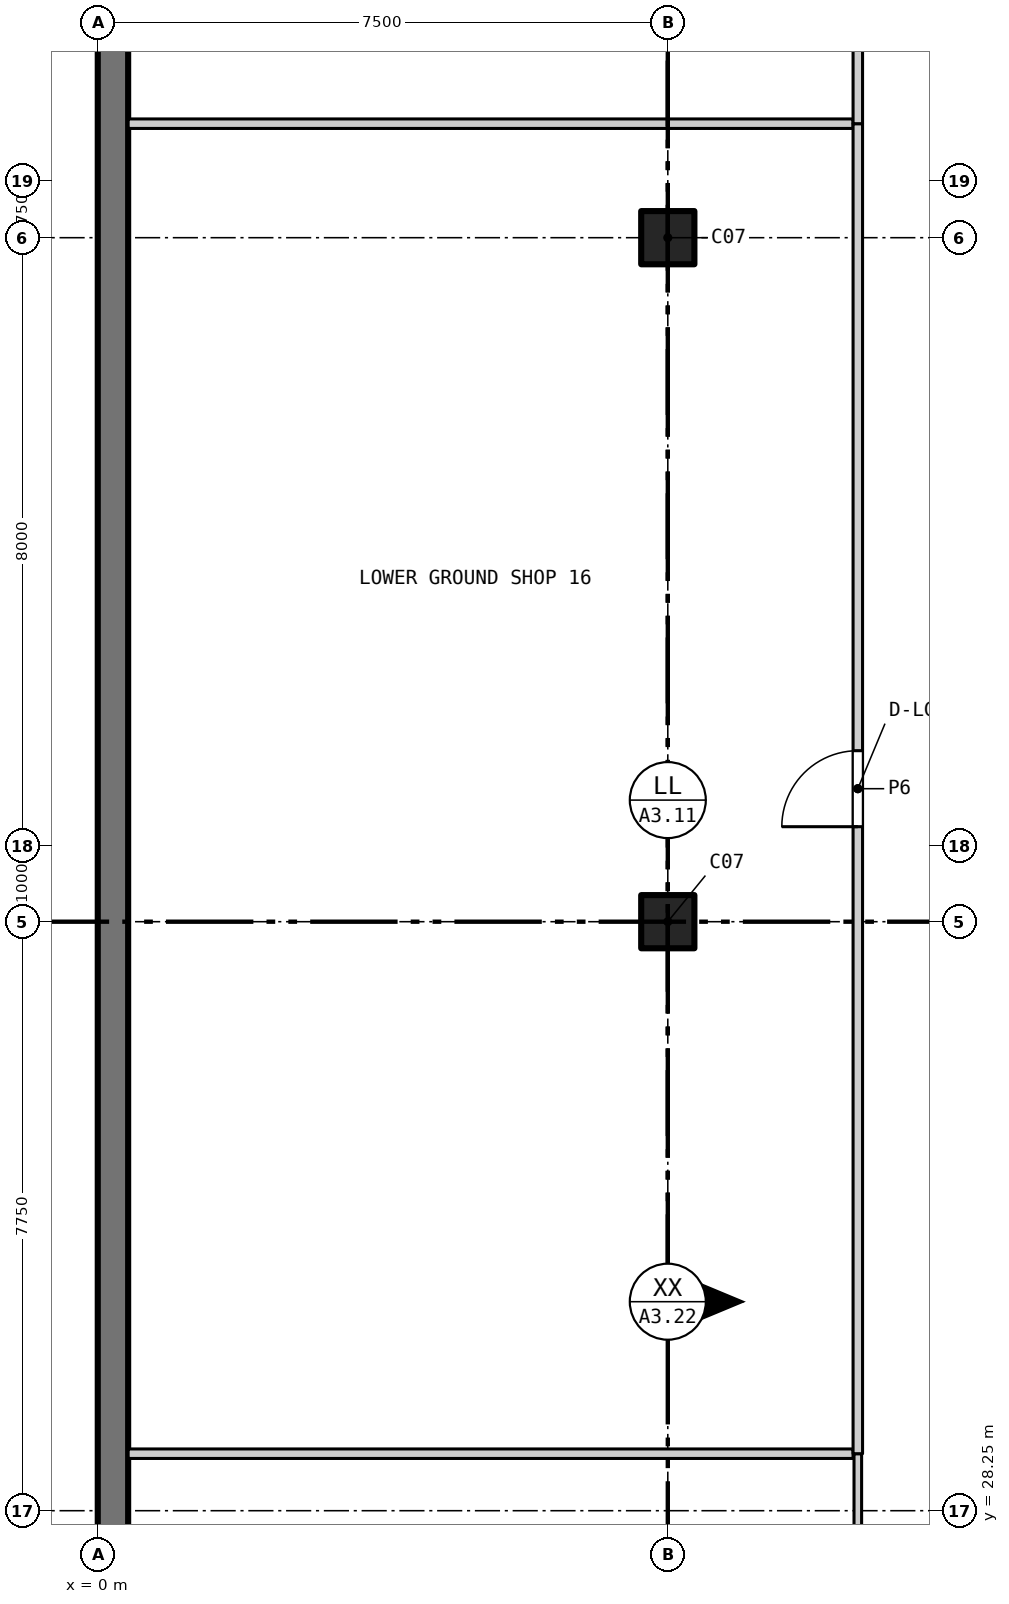
"""IFC4 building model, lengths in metres.
Left out: names, types, materials, properties, quantities, classifications, styles, units other than length and angle.
Written with IfcOpenShell. Run it as: python <this file> out.ifc"""

import sys

from ifc_helpers import new_model, si_unit, direction, frame, frame_2d, origin, origin_2d, place, context, subcontext, project, spatial, rectangle, extrude, element, fill, save


model = new_model("IFC4")
c1 = context("Model", 3, precision=1e-05, world=origin(), true_north=direction((0.0, 1.0)))
c2 = subcontext(c1, "Body", "Model", "MODEL_VIEW")
j1 = project(units=[si_unit("LENGTHUNIT", "METRE"), si_unit("PLANEANGLEUNIT", "RADIAN")], contexts=[c1])
p1 = place(None, origin())
s1 = spatial("IfcSite", under=j1, at=p1, CompositionType="ELEMENT")
p2 = place(p1, origin())
s2 = spatial("IfcBuilding", under=s1, at=p2, CompositionType="ELEMENT")
p3 = place(p2, frame((0.0, 0.0, -5.0)))
s3 = spatial("IfcBuildingStorey", under=s2, at=p3, CompositionType="ELEMENT", Elevation=-5.0)
for number, where, z_axis, x_axis in (
    (1, (7.5, 36.0, 0.0), (0.0, 0.0, 1.0), (1.0, 0.0, 0.0)),
    (2, (7.5, 45.0, 0.0), (0.0, 0.0, 1.0), (1.0, 0.0, 0.0)),
):
    element("IfcColumn", number, at=place(p3, frame(where, z_axis=z_axis, x_axis=x_axis)), inside=s3, PredefinedType="COLUMN", context=c2, shape_type="SweptSolid", body=[
        extrude(rectangle(XDim=0.7, YDim=0.7, at=origin_2d()), origin(), (0.0, 0.0, 1.0), 5.0),
    ])
p4 = place(p3, frame((0.2, 18.0, 0.0), z_axis=(0.0, 0.0, 1.0), x_axis=(0.0, 1.0, 0.0)))
e3 = element("IfcWall", 3, at=p4, inside=s3, PredefinedType="SOLIDWALL", context=c2, shape_type="SweptSolid", body=[
    extrude(rectangle(XDim=108.0, YDim=0.4, at=frame_2d((54.0, 0.0))), origin(), (0.0, 0.0, 1.0), 5.0),
])
for number, where, z_axis, x_axis in (
    (4, (0.4, 29.0, 0.0), (0.0, 0.0, 1.0), (1.0, 0.0, 0.0)),
    (5, (0.4, 46.5, 0.0), (0.0, 0.0, 1.0), (1.0, 0.0, 0.0)),
):
    element("IfcWall", number, at=place(p3, frame(where, z_axis=z_axis, x_axis=x_axis)), inside=s3, PredefinedType="PARTITIONING", context=c2, shape_type="SweptSolid", body=[
        extrude(rectangle(XDim=9.538, YDim=0.125, at=frame_2d((4.769, 0.0))), origin(), (0.0, 0.0, 1.0), 4.7),
    ])
p5 = place(p3, frame((10.0, 27.05, 0.0), z_axis=(0.0, 0.0, 1.0), x_axis=(0.0, 1.0, 0.0)))
e6 = element("IfcWall", 6, at=p5, inside=s3, PredefinedType="PARTITIONING", context=c2, shape_type="SweptSolid", body=[
    extrude(rectangle(XDim=1.95, YDim=0.1, at=frame_2d((0.975, 0.0))), origin(), (0.0, 0.0, 1.0), 4.7),
])
p6 = place(p3, frame((10.0, 29.0, 0.0), z_axis=(0.0, 0.0, 1.0), x_axis=(0.0, 1.0, 0.0)))
e7 = element("IfcWall", 7, at=p6, inside=s3, PredefinedType="PARTITIONING", context=c2, shape_type="SweptSolid", body=[
    extrude(rectangle(XDim=17.5, YDim=0.125, at=frame_2d((8.75, 0.0))), origin(), (0.0, 0.0, 1.0), 4.7),
])
p7 = place(p6, frame((8.25, 0.0, 0.0)))
e8 = element("IfcOpeningElement", 8, at=p7, cuts=e7, PredefinedType="OPENING", context=c2, shape_type="SweptSolid", body=[
    extrude(rectangle(XDim=1.0, YDim=2.1, at=frame_2d((0.5, 1.05))), frame((0.0, 0.073, 0.0), z_axis=(0.0, -1.0, 0.0), x_axis=(1.0, 0.0, 0.0)), (0.0, 0.0, 1.0), 0.145),
])
p8 = place(p3, frame((10.0, 46.5, 0.0), z_axis=(0.0, 0.0, 1.0), x_axis=(0.0, 1.0, 0.0)))
e9 = element("IfcWall", 9, at=p8, inside=s3, PredefinedType="PARTITIONING", context=c2, shape_type="SweptSolid", body=[
    extrude(rectangle(XDim=17.5, YDim=0.125, at=frame_2d((8.75, 0.0))), origin(), (0.0, 0.0, 1.0), 4.7),
])
p9 = place(p8, frame((8.25, 0.0, 0.0)))
e10 = element("IfcOpeningElement", 10, at=p9, cuts=e9, PredefinedType="OPENING", context=c2, shape_type="SweptSolid", body=[
    extrude(rectangle(XDim=1.0, YDim=2.1, at=frame_2d((0.5, 1.05))), frame((0.0, 0.073, 0.0), z_axis=(0.0, -1.0, 0.0), x_axis=(1.0, 0.0, 0.0)), (0.0, 0.0, 1.0), 0.145),
])
p10 = place(p7, origin())
e11 = element("IfcDoor", 11, at=p10, inside=s3, OperationType="SINGLE_SWING_LEFT", PredefinedType="DOOR", context=c2, shape_type="SweptSolid", body=[
    extrude(rectangle(XDim=1.0, YDim=2.1, at=frame_2d((0.5, 1.05))), frame((0.0, 0.025, 0.0), z_axis=(0.0, -1.0, 0.0), x_axis=(1.0, 0.0, 0.0)), (0.0, 0.0, 1.0), 0.05),
])
fill(e8, e11)
save(model, sys.argv[1])
